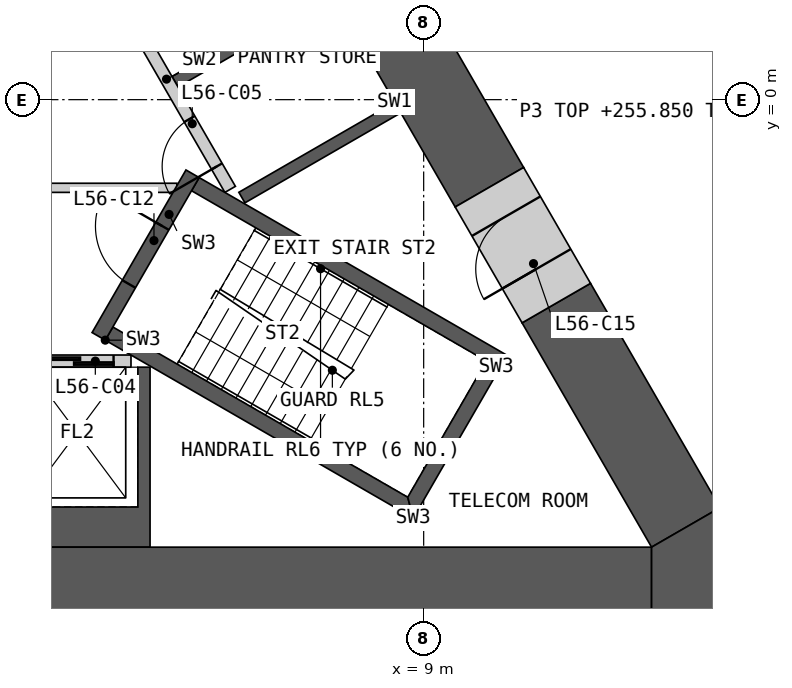
"""IFC4 building model, lengths in metres.
Left out: names, types, materials, properties, quantities, classifications, styles, units other than length and angle.
Written with IfcOpenShell. Run it as: python <this file> out.ifc"""

import sys

from ifc_helpers import new_model, si_unit, direction, frame, frame_2d, origin, place, context, subcontext, project, spatial, polyline, rectangle, outline, extrude, element, fill, save


model = new_model("IFC4")
c1 = context("Model", 3, precision=1e-05, world=origin(), true_north=direction((0.0, 1.0)))
c2 = subcontext(c1, "Body", "Model", "MODEL_VIEW")
j1 = project(units=[si_unit("LENGTHUNIT", "METRE"), si_unit("PLANEANGLEUNIT", "RADIAN")], contexts=[c1])
p1 = place(None, origin())
s1 = spatial("IfcSite", under=j1, at=p1, CompositionType="ELEMENT")
p2 = place(p1, origin())
s2 = spatial("IfcBuilding", under=s1, at=p2, CompositionType="ELEMENT")
p3 = place(p2, frame((0.0, 0.0, 252.6)))
s3 = spatial("IfcBuildingStorey", under=s2, at=p3, CompositionType="ELEMENT", Elevation=252.6)
p4 = place(p3, origin())
e1 = element("IfcWall", 1, at=p4, inside=s3, PredefinedType="SHEAR", context=c2, shape_type="SweptSolid", body=[
    extrude(outline(polyline([(2.1, -7.36), (2.1, -4.4), (2.3, -4.4), (2.3, -6.7), (4.3, -6.7), (4.3, -4.4), (4.5, -4.4), (4.5, -7.36), (2.1, -7.36)])), origin(), (0.0, 0.0, 1.0), 3.25),
])
p5 = place(p3, frame((-4.187, -4.3, 0.0), z_axis=(0.0, 0.0, 1.0), x_axis=(1.0, 0.0, 0.0)))
e2 = element("IfcWall", 2, at=p5, inside=s3, PredefinedType="SOLIDWALL", context=c2, shape_type="SweptSolid", body=[
    extrude(rectangle(XDim=8.373, YDim=0.2, at=frame_2d((4.187, 0.0))), origin(), (0.0, 0.0, 1.0), 3.25),
])
p6 = place(p5, frame((0.287, 0.0, 0.0)))
e3 = element("IfcOpeningElement", 3, at=p6, cuts=e2, PredefinedType="OPENING", context=c2, shape_type="SweptSolid", body=[
    extrude(rectangle(XDim=1.2, YDim=2.1, at=frame_2d((0.6, 1.05))), frame((0.0, 0.11, 0.0), z_axis=(0.0, -1.0, 0.0), x_axis=(1.0, 0.0, 0.0)), (0.0, 0.0, 1.0), 0.22),
])
p7 = place(p5, frame((2.387, 0.0, 0.0)))
e4 = element("IfcOpeningElement", 4, at=p7, cuts=e2, PredefinedType="OPENING", context=c2, shape_type="SweptSolid", body=[
    extrude(rectangle(XDim=1.4, YDim=2.1, at=frame_2d((0.7, 1.05))), frame((0.0, 0.11, 0.0), z_axis=(0.0, -1.0, 0.0), x_axis=(1.0, 0.0, 0.0)), (0.0, 0.0, 1.0), 0.22),
])
p8 = place(p5, frame((4.837, 0.0, 0.0)))
e5 = element("IfcOpeningElement", 5, at=p8, cuts=e2, PredefinedType="OPENING", context=c2, shape_type="SweptSolid", body=[
    extrude(rectangle(XDim=0.9, YDim=2.1, at=frame_2d((0.45, 1.05))), frame((0.0, 0.11, 0.0), z_axis=(0.0, -1.0, 0.0), x_axis=(1.0, 0.0, 0.0)), (0.0, 0.0, 1.0), 0.22),
])
p9 = place(p5, frame((6.887, 0.0, 0.0)))
e6 = element("IfcOpeningElement", 6, at=p9, cuts=e2, PredefinedType="OPENING", context=c2, shape_type="SweptSolid", body=[
    extrude(rectangle(XDim=1.2, YDim=2.1, at=frame_2d((0.6, 1.05))), frame((0.0, 0.11, 0.0), z_axis=(0.0, -1.0, 0.0), x_axis=(1.0, 0.0, 0.0)), (0.0, 0.0, 1.0), 0.22),
])
p10 = place(p3, origin())
e7 = element("IfcWall", 7, at=p10, inside=s3, PredefinedType="SHEAR", context=c2, shape_type="SweptSolid", body=[
    extrude(outline(polyline([(8.524, -0.044), (8.624, -0.217), (8.231, -0.444), (6.061, -1.697), (5.96, -1.524), (8.131, -0.271), (8.524, -0.044)])), origin(), (0.0, 0.0, 1.0), 3.25),
])
p11 = place(p3, origin())
e8 = element("IfcWall", 8, at=p11, inside=s3, PredefinedType="SHEAR", context=c2, shape_type="SweptSolid", body=[
    extrude(outline(polyline([(7.524, 1.688), (7.131, 1.461), (4.96, 0.208), (4.861, 0.381), (6.852, 1.531), (4.752, 5.169), (2.76, 4.019), (2.66, 4.192), (4.652, 5.342), (3.652, 7.074), (1.66, 5.924), (1.561, 6.097), (3.731, 7.35), (4.124, 7.577), (7.524, 1.688)])), origin(), (0.0, 0.0, 1.0), 3.25),
])
p12 = place(p3, frame((5.817, -1.476, 0.0), z_axis=(0.0, 0.0, 1.0), x_axis=(-0.500002616675, 0.866023893041, 0.0)))
e9 = element("IfcWall", 9, at=p12, inside=s3, PredefinedType="SOLIDWALL", context=c2, shape_type="SweptSolid", body=[
    extrude(rectangle(XDim=8.373, YDim=0.2, at=frame_2d((4.187, 0.0))), origin(), (0.0, 0.0, 1.0), 3.25),
])
p13 = place(p12, frame((0.437, 0.0, 0.0)))
e10 = element("IfcOpeningElement", 10, at=p13, cuts=e9, PredefinedType="OPENING", context=c2, shape_type="SweptSolid", body=[
    extrude(rectangle(XDim=0.9, YDim=2.1, at=frame_2d((0.45, 1.05))), frame((0.0, 0.11, 0.0), z_axis=(0.0, -1.0, 0.0), x_axis=(1.0, 0.0, 0.0)), (0.0, 0.0, 1.0), 0.22),
])
p14 = place(p12, frame((3.737, 0.0, 0.0)))
e11 = element("IfcOpeningElement", 11, at=p14, cuts=e9, PredefinedType="OPENING", context=c2, shape_type="SweptSolid", body=[
    extrude(rectangle(XDim=0.9, YDim=2.1, at=frame_2d((0.45, 1.05))), frame((0.0, 0.11, 0.0), z_axis=(0.0, -1.0, 0.0), x_axis=(1.0, 0.0, 0.0)), (0.0, 0.0, 1.0), 0.22),
])
p15 = place(p12, frame((6.937, 0.0, 0.0)))
e12 = element("IfcOpeningElement", 12, at=p15, cuts=e9, PredefinedType="OPENING", context=c2, shape_type="SweptSolid", body=[
    extrude(rectangle(XDim=1.1, YDim=2.1, at=frame_2d((0.55, 1.05))), frame((0.0, 0.11, 0.0), z_axis=(0.0, -1.0, 0.0), x_axis=(1.0, 0.0, 0.0)), (0.0, 0.0, 1.0), 0.22),
])
p16 = place(p3, frame((-4.941, -1.45, 0.0), z_axis=(0.0, 0.0, 1.0), x_axis=(1.0, 0.0, 0.0)))
e13 = element("IfcWall", 13, at=p16, inside=s3, PredefinedType="PARTITIONING", context=c2, shape_type="SweptSolid", body=[
    extrude(rectangle(XDim=9.882, YDim=0.15, at=frame_2d((4.941, 0.0))), origin(), (0.0, 0.0, 1.0), 3.25),
])
p17 = place(p16, frame((4.391, 0.0, 0.0)))
e14 = element("IfcOpeningElement", 14, at=p17, cuts=e13, PredefinedType="OPENING", context=c2, shape_type="SweptSolid", body=[
    extrude(rectangle(XDim=1.1, YDim=2.1, at=frame_2d((0.55, 1.05))), frame((0.0, 0.085, 0.0), z_axis=(0.0, -1.0, 0.0), x_axis=(1.0, 0.0, 0.0)), (0.0, 0.0, 1.0), 0.17),
])
p18 = place(p3, origin())
e15 = element("IfcWall", 15, at=p18, inside=s3, PredefinedType="SHEAR", context=c2, shape_type="SweptSolid", body=[
    extrude(outline(polyline([(3.763, -3.956), (8.83, -6.881), (8.738, -6.539), (3.888, -3.739), (3.763, -3.956)])), origin(), (0.0, 0.0, 1.0), 3.25),
])
p19 = place(p3, origin())
e16 = element("IfcWall", 16, at=p19, inside=s3, PredefinedType="SHEAR", context=c2, shape_type="SweptSolid", body=[
    extrude(outline(polyline([(8.83, -6.881), (10.374, -4.206), (10.032, -4.298), (8.738, -6.539), (8.83, -6.881)])), origin(), (0.0, 0.0, 1.0), 3.25),
])
p20 = place(p3, origin())
e17 = element("IfcWall", 17, at=p20, inside=s3, PredefinedType="SHEAR", context=c2, shape_type="SweptSolid", body=[
    extrude(outline(polyline([(10.032, -4.298), (10.374, -4.206), (5.307, -1.281), (5.182, -1.498), (10.032, -4.298)])), origin(), (0.0, 0.0, 1.0), 3.25),
])
p21 = place(p3, frame((3.655, -3.893, 0.0), z_axis=(0.0, 0.0, 1.0), x_axis=(0.499982516597, 0.866035497597, 0.0)))
e18 = element("IfcWall", 18, at=p21, inside=s3, PredefinedType="SHEAR", context=c2, shape_type="SweptSolid", body=[
    extrude(rectangle(XDim=3.088, YDim=0.25, at=frame_2d((1.544, 0.0))), origin(), (0.0, 0.0, 1.0), 3.25),
])
p22 = place(p21, frame((0.994, 0.0, 0.0)))
e19 = element("IfcOpeningElement", 19, at=p22, cuts=e18, PredefinedType="OPENING", context=c2, shape_type="SweptSolid", body=[
    extrude(rectangle(XDim=1.1, YDim=2.1, at=frame_2d((0.55, 1.05))), frame((0.0, 0.135, 0.0), z_axis=(0.0, -1.0, 0.0), x_axis=(1.0, 0.0, 0.0)), (0.0, 0.0, 1.0), 0.27),
])
p23 = place(p3, frame((-12.748, -8.01, 0.0), z_axis=(0.0, 0.0, 1.0), x_axis=(1.0, 0.0, 0.0)))
e20 = element("IfcWall", 20, at=p23, inside=s3, PredefinedType="SHEAR", context=c2, shape_type="SweptSolid", body=[
    extrude(rectangle(XDim=25.497, YDim=1.3, at=frame_2d((12.748, 0.0))), origin(), (0.0, 0.0, 1.0), 3.25),
])
p24 = place(p3, frame((10.081, -1.441, 0.0), z_axis=(0.0, 0.0, 1.0), x_axis=(-0.500006109471, 0.866021876451, 0.0)))
e21 = element("IfcWall", 21, at=p24, inside=s3, PredefinedType="SHEAR", context=c2, shape_type="SweptSolid", body=[
    extrude(rectangle(XDim=11.672, YDim=1.3, at=frame_2d((5.836, 0.0))), origin(), (0.0, 0.0, 1.0), 3.25),
])
p25 = place(p3, frame((13.311, -7.035, 0.0), z_axis=(0.0, 0.0, 1.0), x_axis=(-0.500003555838, 0.866023350811, 0.0)))
e22 = element("IfcWall", 22, at=p25, inside=s3, PredefinedType="SHEAR", context=c2, shape_type="SweptSolid", body=[
    extrude(rectangle(XDim=4.26, YDim=1.3, at=frame_2d((2.13, 0.0))), origin(), (0.0, 0.0, 1.0), 3.25),
])
p26 = place(p3, origin())
e23 = element("IfcWall", 23, at=p26, inside=s3, PredefinedType="SHEAR", context=c2, shape_type="SweptSolid", body=[
    extrude(outline(polyline([(12.748, -8.66), (12.748, -7.36), (13.874, -6.71), (15.0, -8.66), (12.748, -8.66)])), origin(), (0.0, 0.0, 1.0), 3.25),
])
p27 = place(p3, frame((11.181, -3.346, 0.0), z_axis=(0.0, 0.0, 1.0), x_axis=(-0.499946605688, 0.86605622881, 0.0)))
e24 = element("IfcWall", 24, at=p27, inside=s3, PredefinedType="SHEAR", context=c2, shape_type="SweptSolid", body=[
    extrude(rectangle(XDim=2.2, YDim=1.3, at=frame_2d((1.1, 0.0))), origin(), (0.0, 0.0, 1.0), 3.25),
])
p28 = place(p27, frame((0.65, 0.0, 0.0)))
e25 = element("IfcOpeningElement", 25, at=p28, cuts=e24, PredefinedType="OPENING", context=c2, shape_type="SweptSolid", body=[
    extrude(rectangle(XDim=1.0, YDim=2.1, at=frame_2d((0.5, 1.05))), frame((0.0, 0.66, 0.0), z_axis=(0.0, -1.0, 0.0), x_axis=(1.0, 0.0, 0.0)), (0.0, 0.0, 1.0), 1.32),
])
p29 = place(p3, frame((5.377, 18.807, 0.0), z_axis=(0.0, 0.0, 1.0), x_axis=(0.499999852422, -0.866025488988, 0.0)))
e26 = element("IfcWall", 26, at=p29, inside=s3, PredefinedType="PARTITIONING", context=c2, shape_type="SweptSolid", body=[
    extrude(rectangle(XDim=27.198, YDim=0.2, at=frame_2d((13.599, 0.0))), origin(), (0.0, 0.0, 1.0), 3.25),
])
p30 = place(p29, frame((25.096, 0.0, 0.0)))
e27 = element("IfcOpeningElement", 27, at=p30, cuts=e26, PredefinedType="OPENING", context=c2, shape_type="SweptSolid", body=[
    extrude(rectangle(XDim=0.95, YDim=2.1, at=frame_2d((0.475, 1.05))), frame((0.0, 0.11, 0.0), z_axis=(0.0, -1.0, 0.0), x_axis=(1.0, 0.0, 0.0)), (0.0, 0.0, 1.0), 0.22),
])
p31 = place(p29, frame((19.122, 0.0, 0.0)))
e28 = element("IfcOpeningElement", 28, at=p31, cuts=e26, PredefinedType="OPENING", context=c2, shape_type="SweptSolid", body=[
    extrude(rectangle(XDim=1.0, YDim=2.1, at=frame_2d((0.5, 1.05))), frame((0.0, 0.11, 0.0), z_axis=(0.0, -1.0, 0.0), x_axis=(1.0, 0.0, 0.0)), (0.0, 0.0, 1.0), 0.22),
])
p32 = place(p29, frame((17.115, 0.0, 0.0)))
e29 = element("IfcOpeningElement", 29, at=p32, cuts=e26, PredefinedType="OPENING", context=c2, shape_type="SweptSolid", body=[
    extrude(rectangle(XDim=1.1, YDim=2.1, at=frame_2d((0.55, 1.05))), frame((0.0, 0.11, 0.0), z_axis=(0.0, -1.0, 0.0), x_axis=(1.0, 0.0, 0.0)), (0.0, 0.0, 1.0), 0.22),
])
p33 = place(p29, frame((0.35, 0.0, 0.0)))
e30 = element("IfcOpeningElement", 30, at=p33, cuts=e26, PredefinedType="OPENING", context=c2, shape_type="SweptSolid", body=[
    extrude(rectangle(XDim=1.1, YDim=2.1, at=frame_2d((0.55, 1.05))), frame((0.0, 0.11, 0.0), z_axis=(0.0, -1.0, 0.0), x_axis=(1.0, 0.0, 0.0)), (0.0, 0.0, 1.0), 0.22),
])
p34 = place(p9, origin())
e31 = element("IfcDoor", 31, at=p34, inside=s3, OperationType="SLIDING_TO_LEFT", PredefinedType="DOOR", context=c2, shape_type="SweptSolid", body=[
    extrude(rectangle(XDim=1.2, YDim=2.1, at=frame_2d((0.6, 1.05))), frame((0.0, 0.025, 0.0), z_axis=(0.0, -1.0, 0.0), x_axis=(1.0, 0.0, 0.0)), (0.0, 0.0, 1.0), 0.05),
])
fill(e6, e31)
p35 = place(p13, origin())
e32 = element("IfcDoor", 32, at=p35, inside=s3, OperationType="SINGLE_SWING_LEFT", PredefinedType="DOOR", context=c2, shape_type="SweptSolid", body=[
    extrude(rectangle(XDim=0.9, YDim=2.1, at=frame_2d((0.45, 1.05))), frame((0.0, 0.025, 0.0), z_axis=(0.0, -1.0, 0.0), x_axis=(1.0, 0.0, 0.0)), (0.0, 0.0, 1.0), 0.05),
])
fill(e10, e32)
p36 = place(p22, origin())
e33 = element("IfcDoor", 33, at=p36, inside=s3, OperationType="SINGLE_SWING_RIGHT", PredefinedType="DOOR", context=c2, shape_type="SweptSolid", body=[
    extrude(rectangle(XDim=1.1, YDim=2.1, at=frame_2d((0.55, 1.05))), frame((0.0, 0.025, 0.0), z_axis=(0.0, -1.0, 0.0), x_axis=(1.0, 0.0, 0.0)), (0.0, 0.0, 1.0), 0.05),
])
fill(e19, e33)
p37 = place(p28, origin())
e34 = element("IfcDoor", 34, at=p37, inside=s3, OperationType="SINGLE_SWING_LEFT", PredefinedType="DOOR", context=c2, shape_type="SweptSolid", body=[
    extrude(rectangle(XDim=1.0, YDim=2.1, at=frame_2d((0.5, 1.05))), frame((0.0, 0.405, 0.0), z_axis=(0.0, -1.0, 0.0), x_axis=(1.0, 0.0, 0.0)), (0.0, 0.0, 1.0), 0.05),
])
fill(e25, e34)
save(model, sys.argv[1])
